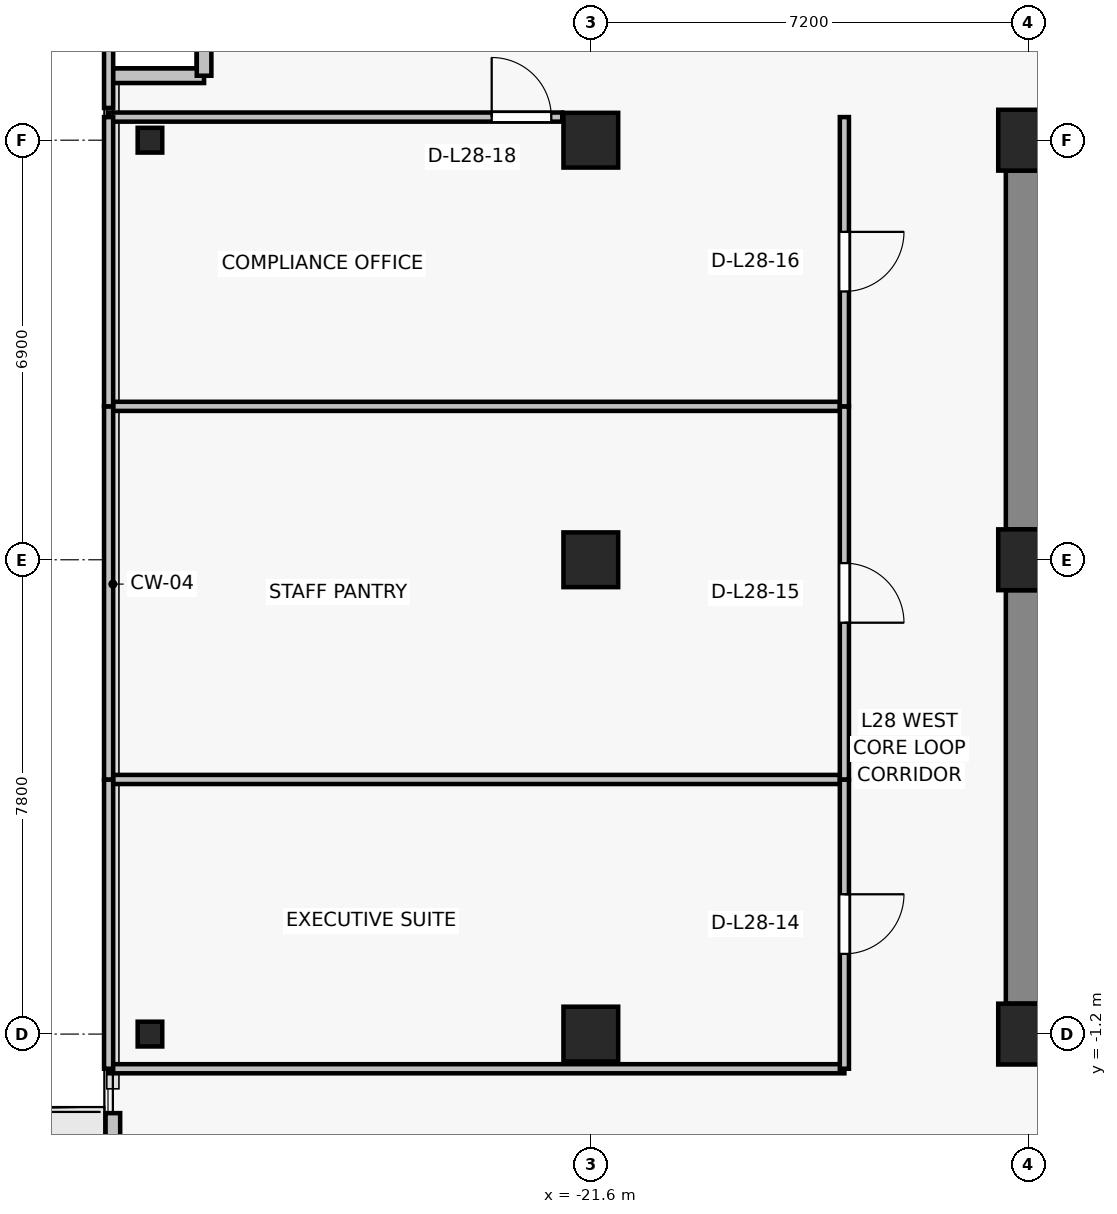
"""IFC4 building model, lengths in metres.
Left out: names, types, materials, properties, quantities, classifications, styles, units other than length and angle.
Written with IfcOpenShell. Run it as: python <this file> out.ifc"""

import sys

from ifc_helpers import new_model, si_unit, direction, frame, frame_2d, origin, origin_2d, place, context, subcontext, project, spatial, rectangle, i_section, extrude, source, transform, mapped, element, fill, save


model = new_model("IFC4")
c1 = context("Model", 3, precision=1e-05, world=origin(), true_north=direction((0.0, 1.0)))
c2 = subcontext(c1, "Body", "Model", "MODEL_VIEW")
j1 = project(units=[si_unit("LENGTHUNIT", "METRE"), si_unit("PLANEANGLEUNIT", "RADIAN")], contexts=[c1])
p1 = place(None, origin())
s1 = spatial("IfcSite", under=j1, at=p1, CompositionType="ELEMENT")
p2 = place(p1, origin())
s2 = spatial("IfcBuilding", under=s1, at=p2, CompositionType="ELEMENT")
p3 = place(p2, frame((0.0, 0.0, 103.3)))
s3 = spatial("IfcBuildingStorey", under=s2, at=p3, CompositionType="ELEMENT", Elevation=103.3)
for number, where, z_axis, x_axis in (
    (1, (-14.4, -1.2, 0.0), (0.0, 0.0, 1.0), (1.0, 0.0, 0.0)),
    (2, (-14.4, 6.6, 0.0), (0.0, 0.0, 1.0), (1.0, 0.0, 0.0)),
    (3, (-14.4, 13.5, 0.0), (0.0, 0.0, 1.0), (1.0, 0.0, 0.0)),
):
    element("IfcColumn", number, at=place(p3, frame(where, z_axis=z_axis, x_axis=x_axis)), inside=s3, PredefinedType="COLUMN", context=c2, shape_type="SweptSolid", body=[
        extrude(rectangle(XDim=1.0, YDim=1.0, at=origin_2d()), origin(), (0.0, 0.0, 1.0), 3.3),
    ])
for number, where, z_axis, x_axis in (
    (4, (-21.6, -1.2, 0.0), (0.0, 0.0, 1.0), (1.0, 0.0, 0.0)),
    (5, (-21.6, 6.6, 0.0), (0.0, 0.0, 1.0), (1.0, 0.0, 0.0)),
    (6, (-21.6, 13.5, 0.0), (0.0, 0.0, 1.0), (1.0, 0.0, 0.0)),
):
    element("IfcColumn", number, at=place(p3, frame(where, z_axis=z_axis, x_axis=x_axis)), inside=s3, PredefinedType="COLUMN", context=c2, shape_type="SweptSolid", body=[
        extrude(rectangle(XDim=0.9, YDim=0.9, at=origin_2d()), origin(), (0.0, 0.0, 1.0), 3.3),
    ])
for number, where, z_axis, x_axis in (
    (7, (-28.85, -1.2, 0.0), (0.0, 0.0, 1.0), (1.0, 0.0, 0.0)),
    (8, (-28.85, 13.5, 0.0), (0.0, 0.0, 1.0), (1.0, 0.0, 0.0)),
):
    element("IfcColumn", number, at=place(p3, frame(where, z_axis=z_axis, x_axis=x_axis)), inside=s3, PredefinedType="COLUMN", context=c2, shape_type="SweptSolid", body=[
        extrude(i_section(OverallWidth=0.404, OverallDepth=0.407, WebThickness=0.022, FlangeThickness=0.032, FilletRadius=0.015, at=origin_2d()), origin(), (0.0, 0.0, 1.0), 3.3),
    ])
p4 = place(p3, frame((-14.4, -0.7, 0.0), z_axis=(0.0, 0.0, 1.0), x_axis=(0.0, 1.0, 0.0)))
e9 = element("IfcWall", 9, at=p4, inside=s3, PredefinedType="SHEAR", context=c2, shape_type="SweptSolid", body=[
    extrude(rectangle(XDim=6.8, YDim=0.75, at=frame_2d((3.4, 0.0))), origin(), (0.0, 0.0, 1.0), 3.075),
])
p5 = place(p3, frame((-14.4, 7.1, 0.0), z_axis=(0.0, 0.0, 1.0), x_axis=(0.0, 1.0, 0.0)))
e10 = element("IfcWall", 10, at=p5, inside=s3, PredefinedType="SHEAR", context=c2, shape_type="SweptSolid", body=[
    extrude(rectangle(XDim=5.9, YDim=0.75, at=frame_2d((2.95, 0.0))), origin(), (0.0, 0.0, 1.0), 3.075),
])
p6 = place(p3, frame((-29.46, -8.3, 0.0), z_axis=(0.0, 0.0, 1.0), x_axis=(0.0, 1.0, 0.0)))
e11 = element("IfcWall", 11, at=p6, inside=s3, PredefinedType="SOLIDWALL", context=c2, shape_type="SweptSolid", body=[
    extrude(rectangle(XDim=5.8, YDim=0.24, at=frame_2d((2.9, 0.0))), origin(), (0.0, 0.0, 1.0), 3.075),
])
p7 = place(p6, frame((0.696, 0.0, 0.0)))
e12 = element("IfcOpeningElement", 12, at=p7, cuts=e11, PredefinedType="OPENING", context=c2, shape_type="SweptSolid", body=[
    extrude(rectangle(XDim=1.0, YDim=2.2, at=frame_2d((0.5, 1.1))), frame((0.0, 0.13, 0.0), z_axis=(0.0, -1.0, 0.0), x_axis=(1.0, 0.0, 0.0)), (0.0, 0.0, 1.0), 0.26),
])
p8 = place(p6, frame((2.046, 0.0, 0.85)))
e13 = element("IfcOpeningElement", 13, at=p8, cuts=e11, PredefinedType="OPENING", context=c2, shape_type="SweptSolid", body=[
    extrude(rectangle(XDim=1.2, YDim=1.5, at=frame_2d((0.6, 0.75))), frame((0.0, 0.13, 0.0), z_axis=(0.0, -1.0, 0.0), x_axis=(1.0, 0.0, 0.0)), (0.0, 0.0, 1.0), 0.26),
])
for number, where, z_axis, x_axis in (
    (14, (-27.96, 14.56, 0.0), (0.0, 0.0, 1.0), (-1.0, 0.0, 0.0)),
    (15, (-27.96, 16.06, 0.0), (0.0, 0.0, 1.0), (0.0, -1.0, 0.0)),
):
    element("IfcWall", number, at=place(p3, frame(where, z_axis=z_axis, x_axis=x_axis)), inside=s3, PredefinedType="SOLIDWALL", context=c2, shape_type="SweptSolid", body=[
        extrude(rectangle(XDim=1.5, YDim=0.24, at=frame_2d((0.75, 0.0))), origin(), (0.0, 0.0, 1.0), 3.075),
    ])
for number, where, z_axis, x_axis in (
    (16, (-17.43, -1.77, 0.0), (0.0, 0.0, 1.0), (-1.0, 0.0, 0.0)),
    (17, (-29.53, 2.987, 0.0), (0.0, 0.0, 1.0), (1.0, 0.0, 0.0)),
):
    element("IfcWall", number, at=place(p3, frame(where, z_axis=z_axis, x_axis=x_axis)), inside=s3, PredefinedType="PARTITIONING", context=c2, shape_type="SweptSolid", body=[
        extrude(rectangle(XDim=12.1, YDim=0.15, at=frame_2d((6.05, 0.0))), origin(), (0.0, 0.0, 1.0), 2.515),
    ])
p9 = place(p3, frame((-29.53, -1.77, 0.0), z_axis=(0.0, 0.0, 1.0), x_axis=(0.0, 1.0, 0.0)))
e18 = element("IfcWall", 18, at=p9, inside=s3, PredefinedType="PARTITIONING", context=c2, shape_type="SweptSolid", body=[
    extrude(rectangle(XDim=4.757, YDim=0.15, at=frame_2d((2.378, 0.0))), origin(), (0.0, 0.0, 1.0), 3.075),
])
p10 = place(p3, frame((-17.43, 2.987, 0.0), z_axis=(0.0, 0.0, 1.0), x_axis=(0.0, -1.0, 0.0)))
e19 = element("IfcWall", 19, at=p10, inside=s3, PredefinedType="PARTITIONING", context=c2, shape_type="SweptSolid", body=[
    extrude(rectangle(XDim=4.757, YDim=0.15, at=frame_2d((2.378, 0.0))), origin(), (0.0, 0.0, 1.0), 2.515),
])
p11 = place(p10, frame((1.888, 0.0, 0.0)))
e20 = element("IfcOpeningElement", 20, at=p11, cuts=e19, PredefinedType="OPENING", context=c2, shape_type="SweptSolid", body=[
    extrude(rectangle(XDim=0.98, YDim=2.15, at=frame_2d((0.49, 1.075))), frame((0.0, 0.085, 0.0), z_axis=(0.0, -1.0, 0.0), x_axis=(1.0, 0.0, 0.0)), (0.0, 0.0, 1.0), 0.17),
])
p12 = place(p3, frame((-29.53, 9.123, 0.0), z_axis=(0.0, 0.0, 1.0), x_axis=(1.0, 0.0, 0.0)))
e21 = element("IfcWall", 21, at=p12, inside=s3, PredefinedType="PARTITIONING", context=c2, shape_type="SweptSolid", body=[
    extrude(rectangle(XDim=12.1, YDim=0.15, at=frame_2d((6.05, 0.0))), origin(), (0.0, 0.0, 1.0), 2.515),
])
p13 = place(p3, frame((-29.53, 2.987, 0.0), z_axis=(0.0, 0.0, 1.0), x_axis=(0.0, 1.0, 0.0)))
e22 = element("IfcWall", 22, at=p13, inside=s3, PredefinedType="PARTITIONING", context=c2, shape_type="SweptSolid", body=[
    extrude(rectangle(XDim=6.136, YDim=0.15, at=frame_2d((3.068, 0.0))), origin(), (0.0, 0.0, 1.0), 3.075),
])
p14 = place(p3, frame((-17.43, 9.123, 0.0), z_axis=(0.0, 0.0, 1.0), x_axis=(0.0, -1.0, 0.0)))
e23 = element("IfcWall", 23, at=p14, inside=s3, PredefinedType="PARTITIONING", context=c2, shape_type="SweptSolid", body=[
    extrude(rectangle(XDim=6.136, YDim=0.15, at=frame_2d((3.068, 0.0))), origin(), (0.0, 0.0, 1.0), 2.515),
])
p15 = place(p14, frame((2.578, 0.0, 0.0)))
e24 = element("IfcOpeningElement", 24, at=p15, cuts=e23, PredefinedType="OPENING", context=c2, shape_type="SweptSolid", body=[
    extrude(rectangle(XDim=0.98, YDim=2.15, at=frame_2d((0.49, 1.075))), frame((0.0, 0.085, 0.0), z_axis=(0.0, -1.0, 0.0), x_axis=(1.0, 0.0, 0.0)), (0.0, 0.0, 1.0), 0.17),
])
p16 = place(p3, frame((-29.53, 13.88, 0.0), z_axis=(0.0, 0.0, 1.0), x_axis=(1.0, 0.0, 0.0)))
e25 = element("IfcWall", 25, at=p16, inside=s3, PredefinedType="PARTITIONING", context=c2, shape_type="SweptSolid", body=[
    extrude(rectangle(XDim=7.46, YDim=0.15, at=frame_2d((3.73, 0.0))), origin(), (0.0, 0.0, 1.0), 3.075),
])
p17 = place(p16, frame((6.3, 0.0, 0.0)))
e26 = element("IfcOpeningElement", 26, at=p17, cuts=e25, PredefinedType="OPENING", context=c2, shape_type="SweptSolid", body=[
    extrude(rectangle(XDim=0.98, YDim=2.15, at=frame_2d((0.49, 1.075))), frame((0.0, 0.085, 0.0), z_axis=(0.0, -1.0, 0.0), x_axis=(1.0, 0.0, 0.0)), (0.0, 0.0, 1.0), 0.17),
])
p18 = place(p3, frame((-29.53, 9.123, 0.0), z_axis=(0.0, 0.0, 1.0), x_axis=(0.0, 1.0, 0.0)))
e27 = element("IfcWall", 27, at=p18, inside=s3, PredefinedType="PARTITIONING", context=c2, shape_type="SweptSolid", body=[
    extrude(rectangle(XDim=4.757, YDim=0.15, at=frame_2d((2.378, 0.0))), origin(), (0.0, 0.0, 1.0), 3.075),
])
p19 = place(p3, frame((-17.43, 13.88, 0.0), z_axis=(0.0, 0.0, 1.0), x_axis=(0.0, -1.0, 0.0)))
e28 = element("IfcWall", 28, at=p19, inside=s3, PredefinedType="PARTITIONING", context=c2, shape_type="SweptSolid", body=[
    extrude(rectangle(XDim=4.757, YDim=0.15, at=frame_2d((2.378, 0.0))), origin(), (0.0, 0.0, 1.0), 2.515),
])
p20 = place(p19, frame((1.888, 0.0, 0.0)))
e29 = element("IfcOpeningElement", 29, at=p20, cuts=e28, PredefinedType="OPENING", context=c2, shape_type="SweptSolid", body=[
    extrude(rectangle(XDim=0.98, YDim=2.15, at=frame_2d((0.49, 1.075))), frame((0.0, 0.085, 0.0), z_axis=(0.0, -1.0, 0.0), x_axis=(1.0, 0.0, 0.0)), (0.0, 0.0, 1.0), 0.17),
])
p21 = place(p3, frame((-29.53, 14.03, 0.0), z_axis=(0.0, 0.0, 1.0), x_axis=(0.0, 1.0, 0.0)))
e30 = element("IfcWall", 30, at=p21, inside=s3, PredefinedType="PARTITIONING", context=c2, shape_type="SweptSolid", body=[
    extrude(rectangle(XDim=3.6, YDim=0.15, at=frame_2d((1.8, 0.0))), origin(), (0.0, 0.0, 1.0), 3.075),
])
m1 = source(origin(), c2, "Body", "SweptSolid", [
    extrude(rectangle(XDim=0.98, YDim=2.15, at=frame_2d((0.49, 1.075))), frame((0.0, 0.025, 0.0), z_axis=(0.0, -1.0, 0.0), x_axis=(1.0, 0.0, 0.0)), (0.0, 0.0, 1.0), 0.05),
])
p22 = place(p11, origin())
e31 = element("IfcDoor", 31, at=p22, inside=s3, OperationType="SINGLE_SWING_LEFT", PredefinedType="DOOR", context=c2, shape_type="MappedRepresentation", body=[
    mapped(m1, transform((0.0, 0.0, 0.0), x_axis=(1.0, 0.0, 0.0), y_axis=(0.0, 1.0, 0.0), z_axis=(0.0, 0.0, 1.0), scale=1.0)),
])
fill(e20, e31)
p23 = place(p15, origin())
e32 = element("IfcDoor", 32, at=p23, inside=s3, OperationType="SINGLE_SWING_RIGHT", PredefinedType="DOOR", context=c2, shape_type="MappedRepresentation", body=[
    mapped(m1, transform((0.0, 0.0, 0.0), x_axis=(1.0, 0.0, 0.0), y_axis=(0.0, 1.0, 0.0), z_axis=(0.0, 0.0, 1.0), scale=1.0)),
])
fill(e24, e32)
p24 = place(p20, origin())
e33 = element("IfcDoor", 33, at=p24, inside=s3, OperationType="SINGLE_SWING_LEFT", PredefinedType="DOOR", context=c2, shape_type="MappedRepresentation", body=[
    mapped(m1, transform((0.0, 0.0, 0.0), x_axis=(1.0, 0.0, 0.0), y_axis=(0.0, 1.0, 0.0), z_axis=(0.0, 0.0, 1.0), scale=1.0)),
])
fill(e29, e33)
p25 = place(p17, origin())
e34 = element("IfcDoor", 34, at=p25, inside=s3, OperationType="SINGLE_SWING_LEFT", PredefinedType="DOOR", context=c2, shape_type="MappedRepresentation", body=[
    mapped(m1, transform((0.0, 0.0, 0.0), x_axis=(1.0, 0.0, 0.0), y_axis=(0.0, 1.0, 0.0), z_axis=(0.0, 0.0, 1.0), scale=1.0)),
])
fill(e26, e34)
save(model, sys.argv[1])
